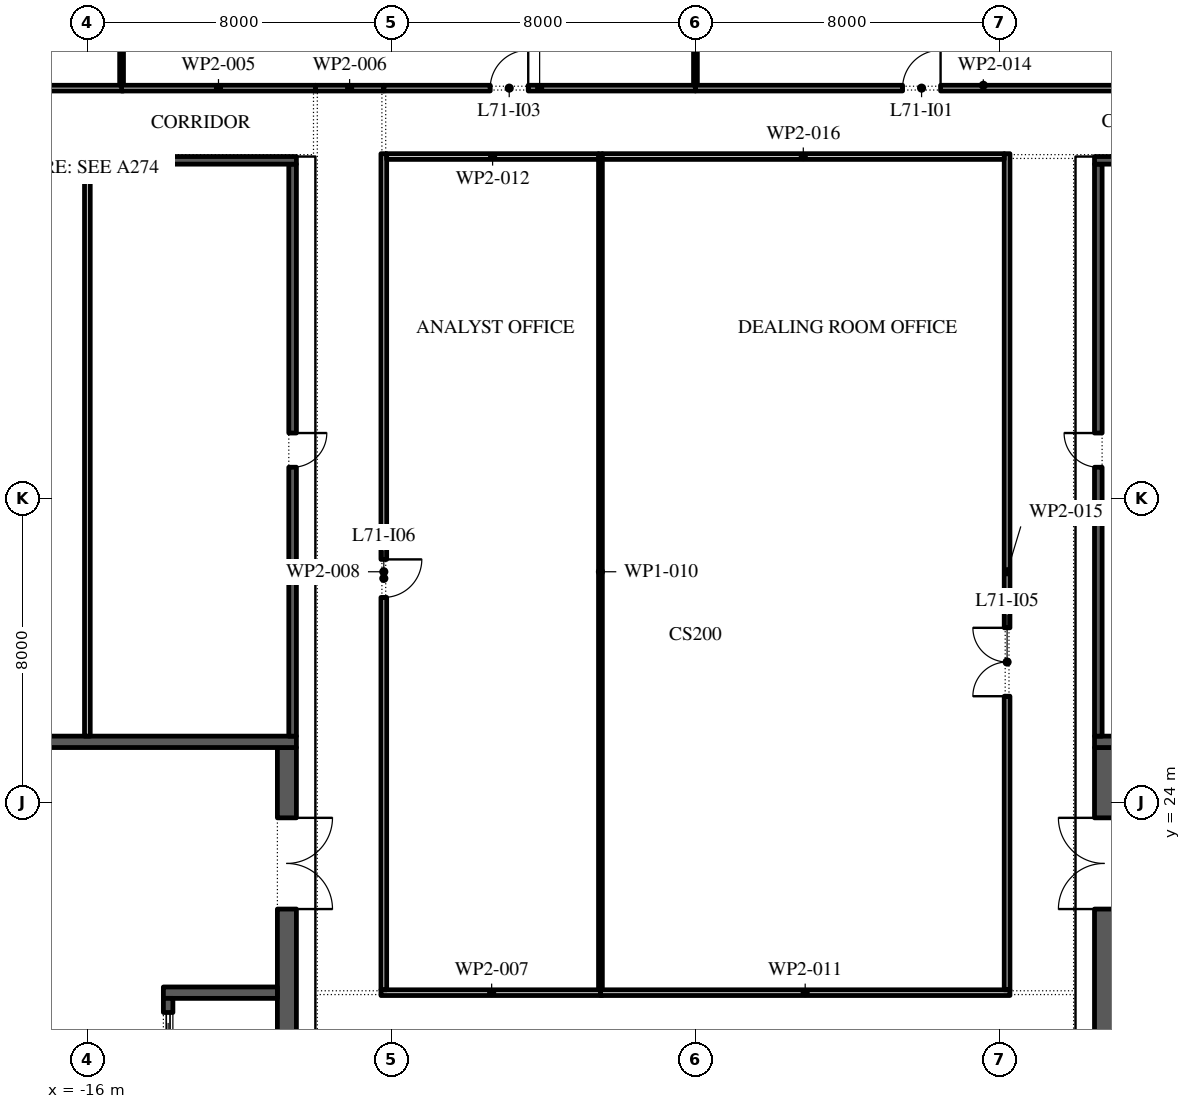
"""IFC4 building model, lengths in metres.
Left out: names, types, materials, properties, quantities, classifications, styles, units other than length and angle.
Written with IfcOpenShell. Run it as: python <this file> out.ifc"""

import sys

from ifc_helpers import new_model, si_unit, direction, frame, frame_2d, origin, place, context, subcontext, project, spatial, rectangle, extrude, element, fill, save


model = new_model("IFC4")
c1 = context("Model", 3, precision=1e-05, world=origin(), true_north=direction((0.0, 1.0)))
c2 = subcontext(c1, "Body", "Model", "MODEL_VIEW")
j1 = project(units=[si_unit("LENGTHUNIT", "METRE"), si_unit("PLANEANGLEUNIT", "RADIAN")], contexts=[c1])
p1 = place(None, origin())
s1 = spatial("IfcSite", under=j1, at=p1, CompositionType="ELEMENT")
p2 = place(p1, origin())
s2 = spatial("IfcBuilding", under=s1, at=p2, CompositionType="ELEMENT")
p3 = place(p2, frame((0.0, 0.0, 325.8)))
s3 = spatial("IfcBuildingStorey", under=s2, at=p3, CompositionType="ELEMENT", Elevation=325.8)
p4 = place(p3, frame((-10.75, -2.45, 0.0), z_axis=(0.0, 0.0, 1.0), x_axis=(0.0, 1.0, 0.0)))
e1 = element("IfcWall", 1, at=p4, inside=s3, PredefinedType="SHEAR", context=c2, shape_type="SweptSolid", body=[
    extrude(rectangle(XDim=27.9, YDim=0.5, at=frame_2d((13.95, 0.0))), origin(), (0.0, 0.0, 1.0), 4.0),
])
p5 = place(p4, frame((23.65, 0.0, 0.0)))
e2 = element("IfcOpeningElement", 2, at=p5, cuts=e1, PredefinedType="OPENING", context=c2, shape_type="SweptSolid", body=[
    extrude(rectangle(XDim=2.4, YDim=2.1, at=frame_2d((1.2, 1.05))), frame((0.0, 0.26, 0.0), z_axis=(0.0, -1.0, 0.0), x_axis=(1.0, 0.0, 0.0)), (0.0, 0.0, 1.0), 0.52),
])
p6 = place(p4, frame((1.387, 0.0, 0.0)))
e3 = element("IfcOpeningElement", 3, at=p6, cuts=e1, PredefinedType="OPENING", context=c2, shape_type="SweptSolid", body=[
    extrude(rectangle(XDim=0.9, YDim=2.1, at=frame_2d((0.45, 1.05))), frame((0.0, 0.26, 0.0), z_axis=(0.0, -1.0, 0.0), x_axis=(1.0, 0.0, 0.0)), (0.0, 0.0, 1.0), 0.52),
])
p7 = place(p4, frame((4.562, 0.0, 0.0)))
e4 = element("IfcOpeningElement", 4, at=p7, cuts=e1, PredefinedType="OPENING", context=c2, shape_type="SweptSolid", body=[
    extrude(rectangle(XDim=1.0, YDim=2.1, at=frame_2d((0.5, 1.05))), frame((0.0, 0.26, 0.0), z_axis=(0.0, -1.0, 0.0), x_axis=(1.0, 0.0, 0.0)), (0.0, 0.0, 1.0), 0.52),
])
p8 = place(p3, frame((-21.5, 25.6, 0.0), z_axis=(0.0, 0.0, 1.0), x_axis=(1.0, 0.0, 0.0)))
e5 = element("IfcWall", 5, at=p8, inside=s3, PredefinedType="SHEAR", context=c2, shape_type="SweptSolid", body=[
    extrude(rectangle(XDim=11.0, YDim=0.3, at=frame_2d((5.5, 0.0))), origin(), (0.0, 0.0, 1.0), 4.0),
])
p9 = place(p3, frame((-14.0, 19.0, 0.0), z_axis=(0.0, 0.0, 1.0), x_axis=(1.0, 0.0, 0.0)))
e6 = element("IfcWall", 6, at=p9, inside=s3, PredefinedType="SHEAR", context=c2, shape_type="SweptSolid", body=[
    extrude(rectangle(XDim=3.0, YDim=0.3, at=frame_2d((1.5, 0.0))), origin(), (0.0, 0.0, 1.0), 4.0),
])
p10 = place(p3, frame((-13.875, -2.45, 0.0), z_axis=(0.0, 0.0, 1.0), x_axis=(0.0, 1.0, 0.0)))
e7 = element("IfcWall", 7, at=p10, inside=s3, PredefinedType="SHEAR", context=c2, shape_type="SweptSolid", body=[
    extrude(rectangle(XDim=21.3, YDim=0.25, at=frame_2d((10.65, 0.0))), origin(), (0.0, 0.0, 1.0), 4.0),
])
p11 = place(p10, frame((9.846, 0.0, 0.0)))
e8 = element("IfcOpeningElement", 8, at=p11, cuts=e7, PredefinedType="OPENING", context=c2, shape_type="SweptSolid", body=[
    extrude(rectangle(XDim=0.9, YDim=2.1, at=frame_2d((0.45, 1.05))), frame((0.0, 0.135, 0.0), z_axis=(0.0, -1.0, 0.0), x_axis=(1.0, 0.0, 0.0)), (0.0, 0.0, 1.0), 0.27),
])
p12 = place(p10, frame((12.911, 0.0, 0.0)))
e9 = element("IfcOpeningElement", 9, at=p12, cuts=e7, PredefinedType="OPENING", context=c2, shape_type="SweptSolid", body=[
    extrude(rectangle(XDim=0.9, YDim=2.1, at=frame_2d((0.45, 1.05))), frame((0.0, 0.135, 0.0), z_axis=(0.0, -1.0, 0.0), x_axis=(1.0, 0.0, 0.0)), (0.0, 0.0, 1.0), 0.27),
])
p13 = place(p10, frame((6.971, 0.0, 0.0)))
e10 = element("IfcOpeningElement", 10, at=p13, cuts=e7, PredefinedType="OPENING", context=c2, shape_type="SweptSolid", body=[
    extrude(rectangle(XDim=1.1, YDim=2.1, at=frame_2d((0.55, 1.05))), frame((0.0, 0.135, 0.0), z_axis=(0.0, -1.0, 0.0), x_axis=(1.0, 0.0, 0.0)), (0.0, 0.0, 1.0), 0.27),
])
p14 = place(p10, frame((15.543, 0.0, 0.0)))
e11 = element("IfcOpeningElement", 11, at=p14, cuts=e7, PredefinedType="OPENING", context=c2, shape_type="SweptSolid", body=[
    extrude(rectangle(XDim=1.1, YDim=2.1, at=frame_2d((0.55, 1.05))), frame((0.0, 0.135, 0.0), z_axis=(0.0, -1.0, 0.0), x_axis=(1.0, 0.0, 0.0)), (0.0, 0.0, 1.0), 0.27),
])
p15 = place(p10, frame((17.686, 0.0, 0.0)))
e12 = element("IfcOpeningElement", 12, at=p15, cuts=e7, PredefinedType="OPENING", context=c2, shape_type="SweptSolid", body=[
    extrude(rectangle(XDim=1.1, YDim=2.1, at=frame_2d((0.55, 1.05))), frame((0.0, 0.135, 0.0), z_axis=(0.0, -1.0, 0.0), x_axis=(1.0, 0.0, 0.0)), (0.0, 0.0, 1.0), 0.27),
])
p16 = place(p10, frame((19.829, 0.0, 0.0)))
e13 = element("IfcOpeningElement", 13, at=p16, cuts=e7, PredefinedType="OPENING", context=c2, shape_type="SweptSolid", body=[
    extrude(rectangle(XDim=1.1, YDim=2.1, at=frame_2d((0.55, 1.05))), frame((0.0, 0.135, 0.0), z_axis=(0.0, -1.0, 0.0), x_axis=(1.0, 0.0, 0.0)), (0.0, 0.0, 1.0), 0.27),
])
p17 = place(p3, frame((-10.6, 25.75, 0.0), z_axis=(0.0, 0.0, 1.0), x_axis=(0.0, 1.0, 0.0)))
e14 = element("IfcWall", 14, at=p17, inside=s3, PredefinedType="SHEAR", context=c2, shape_type="SweptSolid", body=[
    extrude(rectangle(XDim=15.05, YDim=0.2, at=frame_2d((7.525, 0.0))), origin(), (0.0, 0.0, 1.0), 4.0),
])
p18 = place(p17, frame((7.075, 0.0, 0.0)))
e15 = element("IfcOpeningElement", 15, at=p18, cuts=e14, PredefinedType="OPENING", context=c2, shape_type="SweptSolid", body=[
    extrude(rectangle(XDim=0.9, YDim=2.1, at=frame_2d((0.45, 1.05))), frame((0.0, 0.11, 0.0), z_axis=(0.0, -1.0, 0.0), x_axis=(1.0, 0.0, 0.0)), (0.0, 0.0, 1.0), 0.22),
])
p19 = place(p3, frame((-21.5, 40.9, 0.0), z_axis=(0.0, 0.0, 1.0), x_axis=(1.0, 0.0, 0.0)))
e16 = element("IfcWall", 16, at=p19, inside=s3, PredefinedType="SHEAR", context=c2, shape_type="SweptSolid", body=[
    extrude(rectangle(XDim=11.0, YDim=0.2, at=frame_2d((5.5, 0.0))), origin(), (0.0, 0.0, 1.0), 4.0),
])
p20 = place(p3, frame((-16.0, 25.75, 0.0), z_axis=(0.0, 0.0, 1.0), x_axis=(0.0, 1.0, 0.0)))
e17 = element("IfcWall", 17, at=p20, inside=s3, PredefinedType="PARTITIONING", context=c2, shape_type="SweptSolid", body=[
    extrude(rectangle(XDim=15.05, YDim=0.15, at=frame_2d((7.525, 0.0))), origin(), (0.0, 0.0, 1.0), 4.0),
])
p21 = place(p3, frame((10.75, -2.45, 0.0), z_axis=(0.0, 0.0, 1.0), x_axis=(0.0, 1.0, 0.0)))
e18 = element("IfcWall", 18, at=p21, inside=s3, PredefinedType="SHEAR", context=c2, shape_type="SweptSolid", body=[
    extrude(rectangle(XDim=27.9, YDim=0.5, at=frame_2d((13.95, 0.0))), origin(), (0.0, 0.0, 1.0), 4.0),
])
p22 = place(p21, frame((23.65, 0.0, 0.0)))
e19 = element("IfcOpeningElement", 19, at=p22, cuts=e18, PredefinedType="OPENING", context=c2, shape_type="SweptSolid", body=[
    extrude(rectangle(XDim=2.4, YDim=2.1, at=frame_2d((1.2, 1.05))), frame((0.0, 0.26, 0.0), z_axis=(0.0, -1.0, 0.0), x_axis=(1.0, 0.0, 0.0)), (0.0, 0.0, 1.0), 0.52),
])
p23 = place(p21, frame((0.788, 0.0, 0.0)))
e20 = element("IfcOpeningElement", 20, at=p23, cuts=e18, PredefinedType="OPENING", context=c2, shape_type="SweptSolid", body=[
    extrude(rectangle(XDim=0.9, YDim=2.1, at=frame_2d((0.45, 1.05))), frame((0.0, 0.26, 0.0), z_axis=(0.0, -1.0, 0.0), x_axis=(1.0, 0.0, 0.0)), (0.0, 0.0, 1.0), 0.52),
])
p24 = place(p21, frame((3.962, 0.0, 0.0)))
e21 = element("IfcOpeningElement", 21, at=p24, cuts=e18, PredefinedType="OPENING", context=c2, shape_type="SweptSolid", body=[
    extrude(rectangle(XDim=1.0, YDim=2.1, at=frame_2d((0.5, 1.05))), frame((0.0, 0.26, 0.0), z_axis=(0.0, -1.0, 0.0), x_axis=(1.0, 0.0, 0.0)), (0.0, 0.0, 1.0), 0.52),
])
p25 = place(p3, frame((10.5, 25.6, 0.0), z_axis=(0.0, 0.0, 1.0), x_axis=(1.0, 0.0, 0.0)))
e22 = element("IfcWall", 22, at=p25, inside=s3, PredefinedType="SHEAR", context=c2, shape_type="SweptSolid", body=[
    extrude(rectangle(XDim=11.0, YDim=0.3, at=frame_2d((5.5, 0.0))), origin(), (0.0, 0.0, 1.0), 4.0),
])
p26 = place(p3, frame((10.6, 25.75, 0.0), z_axis=(0.0, 0.0, 1.0), x_axis=(0.0, 1.0, 0.0)))
e23 = element("IfcWall", 23, at=p26, inside=s3, PredefinedType="SHEAR", context=c2, shape_type="SweptSolid", body=[
    extrude(rectangle(XDim=15.05, YDim=0.2, at=frame_2d((7.525, 0.0))), origin(), (0.0, 0.0, 1.0), 4.0),
])
p27 = place(p26, frame((7.075, 0.0, 0.0)))
e24 = element("IfcOpeningElement", 24, at=p27, cuts=e23, PredefinedType="OPENING", context=c2, shape_type="SweptSolid", body=[
    extrude(rectangle(XDim=0.9, YDim=2.1, at=frame_2d((0.45, 1.05))), frame((0.0, 0.11, 0.0), z_axis=(0.0, -1.0, 0.0), x_axis=(1.0, 0.0, 0.0)), (0.0, 0.0, 1.0), 0.22),
])
p28 = place(p3, frame((10.5, 40.9, 0.0), z_axis=(0.0, 0.0, 1.0), x_axis=(1.0, 0.0, 0.0)))
e25 = element("IfcWall", 25, at=p28, inside=s3, PredefinedType="SHEAR", context=c2, shape_type="SweptSolid", body=[
    extrude(rectangle(XDim=11.0, YDim=0.2, at=frame_2d((5.5, 0.0))), origin(), (0.0, 0.0, 1.0), 4.0),
])
p29 = place(p3, frame((-26.05, 42.8, 0.0), z_axis=(0.0, 0.0, 1.0), x_axis=(1.0, 0.0, 0.0)))
e26 = element("IfcWall", 26, at=p29, inside=s3, PredefinedType="PARTITIONING", context=c2, shape_type="SweptSolid", body=[
    extrude(rectangle(XDim=11.0, YDim=0.15, at=frame_2d((5.5, 0.0))), origin(), (0.0, 0.0, 1.0), 4.0),
])
p30 = place(p29, frame((2.55, 0.0, 0.0)))
e27 = element("IfcOpeningElement", 27, at=p30, cuts=e26, PredefinedType="OPENING", context=c2, shape_type="SweptSolid", body=[
    extrude(rectangle(XDim=1.0, YDim=2.1, at=frame_2d((0.5, 1.05))), frame((0.0, 0.085, 0.0), z_axis=(0.0, -1.0, 0.0), x_axis=(1.0, 0.0, 0.0)), (0.0, 0.0, 1.0), 0.17),
])
p31 = place(p3, frame((-15.1, 42.875, 0.0), z_axis=(0.0, 0.0, 1.0), x_axis=(0.0, 1.0, 0.0)))
e28 = element("IfcWall", 28, at=p31, inside=s3, PredefinedType="PARTITIONING", context=c2, shape_type="SweptSolid", body=[
    extrude(rectangle(XDim=9.925, YDim=0.1, at=frame_2d((4.962, 0.0))), origin(), (0.0, 0.0, 1.0), 4.0),
])
p32 = place(p3, frame((-15.1, 42.8, 0.0), z_axis=(0.0, 0.0, 1.0), x_axis=(1.0, 0.0, 0.0)))
e29 = element("IfcWall", 29, at=p32, inside=s3, PredefinedType="PARTITIONING", context=c2, shape_type="SweptSolid", body=[
    extrude(rectangle(XDim=5.1, YDim=0.15, at=frame_2d((2.55, 0.0))), origin(), (0.0, 0.0, 1.0), 4.0),
])
p33 = place(p3, frame((-10.0, 42.8, 0.0), z_axis=(0.0, 0.0, 1.0), x_axis=(1.0, 0.0, 0.0)))
e30 = element("IfcWall", 30, at=p33, inside=s3, PredefinedType="PARTITIONING", context=c2, shape_type="SweptSolid", body=[
    extrude(rectangle(XDim=1.8, YDim=0.15, at=frame_2d((0.9, 0.0))), origin(), (0.0, 0.0, 1.0), 4.0),
])
p34 = place(p3, frame((-8.275, 19.0, 0.0), z_axis=(0.0, 0.0, 1.0), x_axis=(1.0, 0.0, 0.0)))
e31 = element("IfcWall", 31, at=p34, inside=s3, PredefinedType="PARTITIONING", context=c2, shape_type="SweptSolid", body=[
    extrude(rectangle(XDim=5.825, YDim=0.15, at=frame_2d((2.913, 0.0))), origin(), (0.0, 0.0, 1.0), 4.0),
])
p35 = place(p3, frame((-8.2, 41.075, 0.0), z_axis=(0.0, 0.0, 1.0), x_axis=(0.0, -1.0, 0.0)))
e32 = element("IfcWall", 32, at=p35, inside=s3, PredefinedType="PARTITIONING", context=c2, shape_type="SweptSolid", body=[
    extrude(rectangle(XDim=22.0, YDim=0.15, at=frame_2d((11.0, 0.0))), origin(), (0.0, 0.0, 1.0), 4.0),
])
p36 = place(p35, frame((10.675, 0.0, 0.0)))
e33 = element("IfcOpeningElement", 33, at=p36, cuts=e32, PredefinedType="OPENING", context=c2, shape_type="SweptSolid", body=[
    extrude(rectangle(XDim=1.0, YDim=2.1, at=frame_2d((0.5, 1.05))), frame((0.0, 0.085, 0.0), z_axis=(0.0, -1.0, 0.0), x_axis=(1.0, 0.0, 0.0)), (0.0, 0.0, 1.0), 0.17),
])
p37 = place(p3, frame((-8.2, 42.8, 0.0), z_axis=(0.0, 0.0, 1.0), x_axis=(1.0, 0.0, 0.0)))
e34 = element("IfcWall", 34, at=p37, inside=s3, PredefinedType="PARTITIONING", context=c2, shape_type="SweptSolid", body=[
    extrude(rectangle(XDim=8.2, YDim=0.15, at=frame_2d((4.1, 0.0))), origin(), (0.0, 0.0, 1.0), 4.0),
])
p38 = place(p37, frame((2.8, 0.0, 0.0)))
e35 = element("IfcOpeningElement", 35, at=p38, cuts=e34, PredefinedType="OPENING", context=c2, shape_type="SweptSolid", body=[
    extrude(rectangle(XDim=1.0, YDim=2.1, at=frame_2d((0.5, 1.05))), frame((0.0, 0.085, 0.0), z_axis=(0.0, -1.0, 0.0), x_axis=(1.0, 0.0, 0.0)), (0.0, 0.0, 1.0), 0.17),
])
p39 = place(p3, frame((-2.5, 19.075, 0.0), z_axis=(0.0, 0.0, 1.0), x_axis=(0.0, 1.0, 0.0)))
e36 = element("IfcWall", 36, at=p39, inside=s3, PredefinedType="PARTITIONING", context=c2, shape_type="SweptSolid", body=[
    extrude(rectangle(XDim=22.0, YDim=0.1, at=frame_2d((11.0, 0.0))), origin(), (0.0, 0.0, 1.0), 4.0),
])
p40 = place(p3, frame((-2.5, 19.0, 0.0), z_axis=(0.0, 0.0, 1.0), x_axis=(1.0, 0.0, 0.0)))
e37 = element("IfcWall", 37, at=p40, inside=s3, PredefinedType="PARTITIONING", context=c2, shape_type="SweptSolid", body=[
    extrude(rectangle(XDim=10.775, YDim=0.15, at=frame_2d((5.387, 0.0))), origin(), (0.0, 0.0, 1.0), 4.0),
])
p41 = place(p3, frame((-2.55, 41.0, 0.0), z_axis=(0.0, 0.0, 1.0), x_axis=(-1.0, 0.0, 0.0)))
e38 = element("IfcWall", 38, at=p41, inside=s3, PredefinedType="PARTITIONING", context=c2, shape_type="SweptSolid", body=[
    extrude(rectangle(XDim=5.575, YDim=0.15, at=frame_2d((2.788, 0.0))), origin(), (0.0, 0.0, 1.0), 4.0),
])
p42 = place(p3, frame((0.0, 42.875, 0.0), z_axis=(0.0, 0.0, 1.0), x_axis=(0.0, 1.0, 0.0)))
e39 = element("IfcWall", 39, at=p42, inside=s3, PredefinedType="PARTITIONING", context=c2, shape_type="SweptSolid", body=[
    extrude(rectangle(XDim=9.925, YDim=0.1, at=frame_2d((4.962, 0.0))), origin(), (0.0, 0.0, 1.0), 4.0),
])
p43 = place(p3, frame((0.0, 42.8, 0.0), z_axis=(0.0, 0.0, 1.0), x_axis=(1.0, 0.0, 0.0)))
e40 = element("IfcWall", 40, at=p43, inside=s3, PredefinedType="PARTITIONING", context=c2, shape_type="SweptSolid", body=[
    extrude(rectangle(XDim=15.15, YDim=0.15, at=frame_2d((7.575, 0.0))), origin(), (0.0, 0.0, 1.0), 4.0),
])
p44 = place(p43, frame((5.45, 0.0, 0.0)))
e41 = element("IfcOpeningElement", 41, at=p44, cuts=e40, PredefinedType="OPENING", context=c2, shape_type="SweptSolid", body=[
    extrude(rectangle(XDim=1.0, YDim=2.1, at=frame_2d((0.5, 1.05))), frame((0.0, 0.085, 0.0), z_axis=(0.0, -1.0, 0.0), x_axis=(1.0, 0.0, 0.0)), (0.0, 0.0, 1.0), 0.17),
])
p45 = place(p3, frame((8.2, 19.075, 0.0), z_axis=(0.0, 0.0, 1.0), x_axis=(0.0, 1.0, 0.0)))
e42 = element("IfcWall", 42, at=p45, inside=s3, PredefinedType="PARTITIONING", context=c2, shape_type="SweptSolid", body=[
    extrude(rectangle(XDim=22.0, YDim=0.15, at=frame_2d((11.0, 0.0))), origin(), (0.0, 0.0, 1.0), 4.0),
])
p46 = place(p45, frame((7.725, 0.0, 0.0)))
e43 = element("IfcOpeningElement", 43, at=p46, cuts=e42, PredefinedType="OPENING", context=c2, shape_type="SweptSolid", body=[
    extrude(rectangle(XDim=1.8, YDim=2.1, at=frame_2d((0.9, 1.05))), frame((0.0, 0.085, 0.0), z_axis=(0.0, -1.0, 0.0), x_axis=(1.0, 0.0, 0.0)), (0.0, 0.0, 1.0), 0.17),
])
p47 = place(p3, frame((8.125, 41.0, 0.0), z_axis=(0.0, 0.0, 1.0), x_axis=(-1.0, 0.0, 0.0)))
e44 = element("IfcWall", 44, at=p47, inside=s3, PredefinedType="PARTITIONING", context=c2, shape_type="SweptSolid", body=[
    extrude(rectangle(XDim=10.575, YDim=0.15, at=frame_2d((5.288, 0.0))), origin(), (0.0, 0.0, 1.0), 4.0),
])
p48 = place(p16, origin())
e45 = element("IfcDoor", 45, at=p48, inside=s3, OperationType="SLIDING_TO_LEFT", PredefinedType="DOOR", context=c2, shape_type="SweptSolid", body=[
    extrude(rectangle(XDim=1.1, YDim=2.1, at=frame_2d((0.55, 1.05))), frame((0.0, 0.025, 0.0), z_axis=(0.0, -1.0, 0.0), x_axis=(1.0, 0.0, 0.0)), (0.0, 0.0, 1.0), 0.05),
])
fill(e13, e45)
p49 = place(p5, frame((2.4, 0.0, 0.0), z_axis=(0.0, 0.0, 1.0), x_axis=(-1.0, 0.0, 0.0)))
e46 = element("IfcDoor", 46, at=p49, inside=s3, OperationType="DOUBLE_DOOR_SINGLE_SWING", PredefinedType="DOOR", context=c2, shape_type="SweptSolid", body=[
    extrude(rectangle(XDim=2.4, YDim=2.1, at=frame_2d((1.2, 1.05))), frame((0.0, 0.025, 0.0), z_axis=(0.0, -1.0, 0.0), x_axis=(1.0, 0.0, 0.0)), (0.0, 0.0, 1.0), 0.05),
])
fill(e2, e46)
p50 = place(p18, frame((0.9, 0.15, 0.0), z_axis=(0.0, 0.0, 1.0), x_axis=(-1.0, 0.0, 0.0)))
e47 = element("IfcDoor", 47, at=p50, inside=s3, OperationType="SINGLE_SWING_RIGHT", PredefinedType="DOOR", context=c2, shape_type="SweptSolid", body=[
    extrude(rectangle(XDim=0.9, YDim=2.1, at=frame_2d((0.45, 1.05))), frame((0.0, 0.1, 0.0), z_axis=(0.0, -1.0, 0.0), x_axis=(1.0, 0.0, 0.0)), (0.0, 0.0, 1.0), 0.05),
])
fill(e15, e47)
p51 = place(p22, origin())
e48 = element("IfcDoor", 48, at=p51, inside=s3, OperationType="DOUBLE_DOOR_SINGLE_SWING", PredefinedType="DOOR", context=c2, shape_type="SweptSolid", body=[
    extrude(rectangle(XDim=2.4, YDim=2.1, at=frame_2d((1.2, 1.05))), frame((0.0, 0.025, 0.0), z_axis=(0.0, -1.0, 0.0), x_axis=(1.0, 0.0, 0.0)), (0.0, 0.0, 1.0), 0.05),
])
fill(e19, e48)
p52 = place(p27, origin())
e49 = element("IfcDoor", 49, at=p52, inside=s3, OperationType="SINGLE_SWING_LEFT", PredefinedType="DOOR", context=c2, shape_type="SweptSolid", body=[
    extrude(rectangle(XDim=0.9, YDim=2.1, at=frame_2d((0.45, 1.05))), frame((0.0, -0.05, 0.0), z_axis=(0.0, -1.0, 0.0), x_axis=(1.0, 0.0, 0.0)), (0.0, 0.0, 1.0), 0.05),
])
fill(e24, e49)
p53 = place(p44, origin())
e50 = element("IfcDoor", 50, at=p53, inside=s3, OperationType="SINGLE_SWING_LEFT", PredefinedType="DOOR", context=c2, shape_type="SweptSolid", body=[
    extrude(rectangle(XDim=1.0, YDim=2.1, at=frame_2d((0.5, 1.05))), frame((0.0, 0.025, 0.0), z_axis=(0.0, -1.0, 0.0), x_axis=(1.0, 0.0, 0.0)), (0.0, 0.0, 1.0), 0.05),
])
fill(e41, e50)
p54 = place(p38, origin())
e51 = element("IfcDoor", 51, at=p54, inside=s3, OperationType="SINGLE_SWING_LEFT", PredefinedType="DOOR", context=c2, shape_type="SweptSolid", body=[
    extrude(rectangle(XDim=1.0, YDim=2.1, at=frame_2d((0.5, 1.05))), frame((0.0, 0.025, 0.0), z_axis=(0.0, -1.0, 0.0), x_axis=(1.0, 0.0, 0.0)), (0.0, 0.0, 1.0), 0.05),
])
fill(e35, e51)
p55 = place(p46, origin())
e52 = element("IfcDoor", 52, at=p55, inside=s3, OperationType="SINGLE_SWING_RIGHT", PredefinedType="DOOR", context=c2, shape_type="SweptSolid", body=[
    extrude(rectangle(XDim=1.8, YDim=2.1, at=frame_2d((0.9, 1.05))), frame((0.0, 0.025, 0.0), z_axis=(0.0, -1.0, 0.0), x_axis=(1.0, 0.0, 0.0)), (0.0, 0.0, 1.0), 0.05),
])
fill(e43, e52)
p56 = place(p36, origin())
e53 = element("IfcDoor", 53, at=p56, inside=s3, OperationType="SINGLE_SWING_RIGHT", PredefinedType="DOOR", context=c2, shape_type="SweptSolid", body=[
    extrude(rectangle(XDim=1.0, YDim=2.1, at=frame_2d((0.5, 1.05))), frame((0.0, 0.025, 0.0), z_axis=(0.0, -1.0, 0.0), x_axis=(1.0, 0.0, 0.0)), (0.0, 0.0, 1.0), 0.05),
])
fill(e33, e53)
save(model, sys.argv[1])
